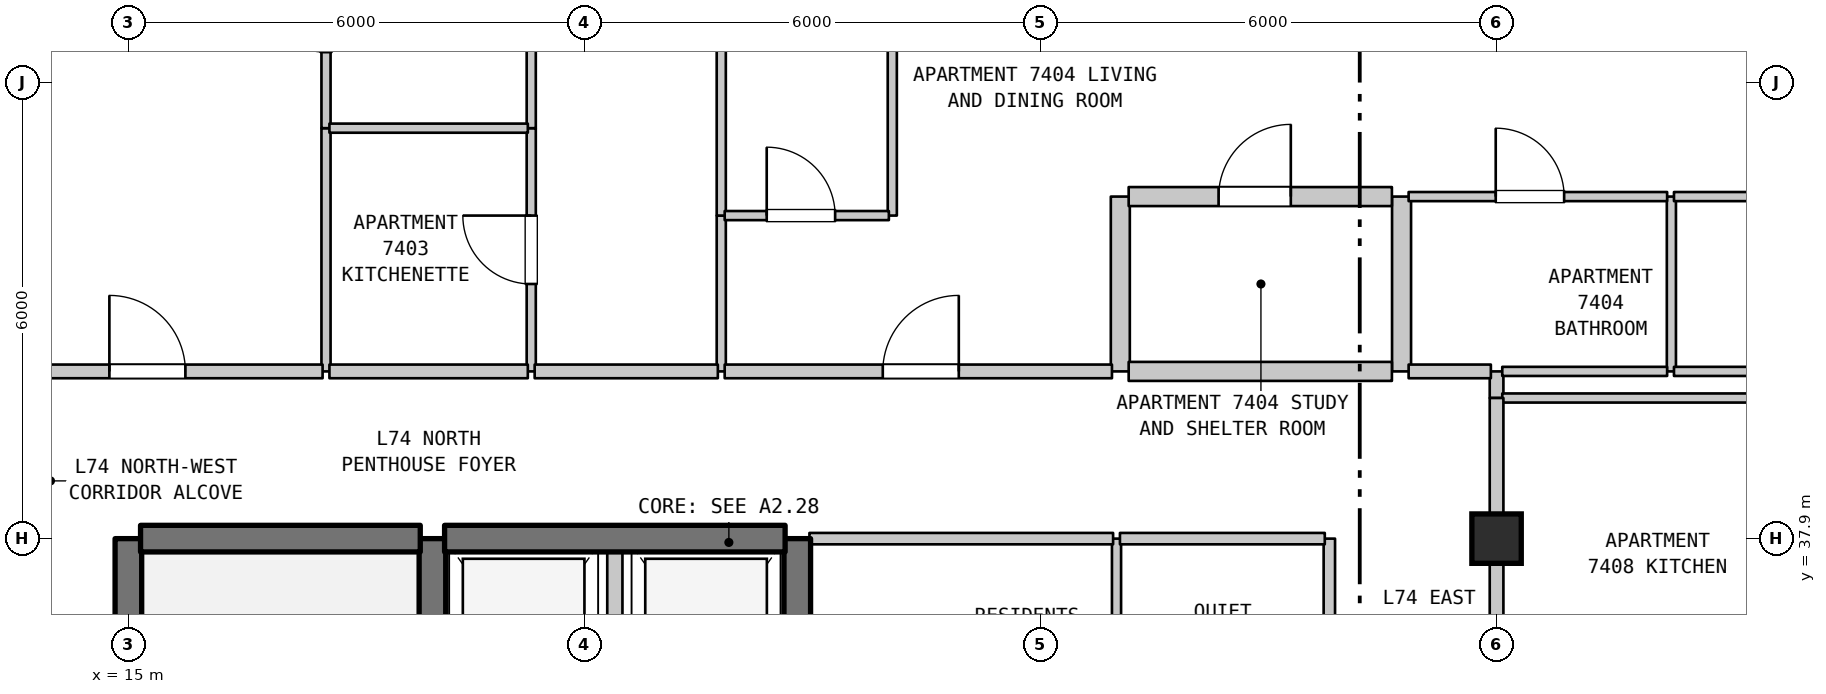
"""IFC4 building model, lengths in metres.
Left out: names, types, materials, properties, quantities, classifications, styles, units other than length and angle.
Written with IfcOpenShell. Run it as: python <this file> out.ifc"""

import sys

from ifc_helpers import new_model, si_unit, direction, frame, frame_2d, origin, origin_2d, place, context, subcontext, project, spatial, rectangle, extrude, element, fill, save


model = new_model("IFC4")
c1 = context("Model", 3, precision=1e-05, world=origin(), true_north=direction((0.0, 1.0)))
c2 = subcontext(c1, "Body", "Model", "MODEL_VIEW")
j1 = project(units=[si_unit("LENGTHUNIT", "METRE"), si_unit("PLANEANGLEUNIT", "RADIAN")], contexts=[c1])
p1 = place(None, origin())
s1 = spatial("IfcSite", under=j1, at=p1, CompositionType="ELEMENT")
p2 = place(p1, origin())
s2 = spatial("IfcBuilding", under=s1, at=p2, CompositionType="ELEMENT")
p3 = place(p2, frame((0.0, 0.0, 295.4)))
s3 = spatial("IfcBuildingStorey", under=s2, at=p3, CompositionType="ELEMENT", Elevation=295.4)
p4 = place(p3, frame((33.0, 37.9, 0.0), z_axis=(0.0, 0.0, 1.0), x_axis=(1.0, 0.0, 0.0)))
e1 = element("IfcColumn", 1, at=p4, inside=s3, PredefinedType="COLUMN", context=c2, shape_type="SweptSolid", body=[
    extrude(rectangle(XDim=0.65, YDim=0.65, at=origin_2d()), origin(), (0.0, 0.0, 1.0), 3.7),
])
p5 = place(p3, frame((15.0, 31.1, 0.0), z_axis=(0.0, 0.0, 1.0), x_axis=(0.0, 1.0, 0.0)))
e2 = element("IfcWall", 2, at=p5, inside=s3, PredefinedType="SHEAR", context=c2, shape_type="SweptSolid", body=[
    extrude(rectangle(XDim=6.8, YDim=0.35, at=frame_2d((3.4, 0.0))), origin(), (0.0, 0.0, 1.0), 3.38),
])
p6 = place(p3, frame((17.6, 40.1, 0.0), z_axis=(0.0, 0.0, 1.0), x_axis=(0.0, 1.0, 0.0)))
e3 = element("IfcWall", 3, at=p6, inside=s3, PredefinedType="PARTITIONING", context=c2, shape_type="SweptSolid", body=[
    extrude(rectangle(XDim=3.2, YDim=0.12, at=frame_2d((1.6, 0.0))), origin(), (0.0, 0.0, 1.0), 3.38),
])
p7 = place(p3, frame((17.6, 43.3, 0.0), z_axis=(0.0, 0.0, 1.0), x_axis=(0.0, 1.0, 0.0)))
e4 = element("IfcWall", 4, at=p7, inside=s3, PredefinedType="PARTITIONING", context=c2, shape_type="SweptSolid", body=[
    extrude(rectangle(XDim=2.9, YDim=0.12, at=frame_2d((1.45, 0.0))), origin(), (0.0, 0.0, 1.0), 3.38),
])
p8 = place(p7, frame((1.0, 0.0, 0.0)))
e5 = element("IfcOpeningElement", 5, at=p8, cuts=e4, PredefinedType="OPENING", context=c2, shape_type="SweptSolid", body=[
    extrude(rectangle(XDim=0.9, YDim=2.1, at=frame_2d((0.45, 1.05))), frame((0.0, 0.07, 0.0), z_axis=(0.0, -1.0, 0.0), x_axis=(1.0, 0.0, 0.0)), (0.0, 0.0, 1.0), 0.14),
])
p9 = place(p3, frame((19.0, 35.0, 0.0), z_axis=(0.0, 0.0, 1.0), x_axis=(0.0, 1.0, 0.0)))
e6 = element("IfcWall", 6, at=p9, inside=s3, PredefinedType="SHEAR", context=c2, shape_type="SweptSolid", body=[
    extrude(rectangle(XDim=2.9, YDim=0.35, at=frame_2d((1.45, 0.0))), origin(), (0.0, 0.0, 1.0), 3.38),
])
p10 = place(p3, frame((20.3, 40.1, 0.0), z_axis=(0.0, 0.0, 1.0), x_axis=(0.0, 1.0, 0.0)))
e7 = element("IfcWall", 7, at=p10, inside=s3, PredefinedType="PARTITIONING", context=c2, shape_type="SweptSolid", body=[
    extrude(rectangle(XDim=3.2, YDim=0.12, at=frame_2d((1.6, 0.0))), origin(), (0.0, 0.0, 1.0), 3.38),
])
p11 = place(p10, frame((1.15, 0.0, 0.0)))
e8 = element("IfcOpeningElement", 8, at=p11, cuts=e7, PredefinedType="OPENING", context=c2, shape_type="SweptSolid", body=[
    extrude(rectangle(XDim=0.9, YDim=2.15, at=frame_2d((0.45, 1.075))), frame((0.0, 0.07, 0.0), z_axis=(0.0, -1.0, 0.0), x_axis=(1.0, 0.0, 0.0)), (0.0, 0.0, 1.0), 0.14),
])
p12 = place(p3, frame((20.3, 43.3, 0.0), z_axis=(0.0, 0.0, 1.0), x_axis=(0.0, 1.0, 0.0)))
e9 = element("IfcWall", 9, at=p12, inside=s3, PredefinedType="PARTITIONING", context=c2, shape_type="SweptSolid", body=[
    extrude(rectangle(XDim=2.9, YDim=0.12, at=frame_2d((1.45, 0.0))), origin(), (0.0, 0.0, 1.0), 3.38),
])
p13 = place(p3, frame((21.4, 35.0, 0.0), z_axis=(0.0, 0.0, 1.0), x_axis=(0.0, 1.0, 0.0)))
e10 = element("IfcWall", 10, at=p13, inside=s3, PredefinedType="STANDARD", context=c2, shape_type="SweptSolid", body=[
    extrude(rectangle(XDim=2.9, YDim=0.2, at=frame_2d((1.45, 0.0))), origin(), (0.0, 0.0, 1.0), 3.38),
])
p14 = place(p3, frame((22.8, 40.1, 0.0), z_axis=(0.0, 0.0, 1.0), x_axis=(0.0, 1.0, 0.0)))
e11 = element("IfcWall", 11, at=p14, inside=s3, PredefinedType="PARTITIONING", context=c2, shape_type="SweptSolid", body=[
    extrude(rectangle(XDim=2.05, YDim=0.12, at=frame_2d((1.025, 0.0))), origin(), (0.0, 0.0, 1.0), 3.38),
])
p15 = place(p3, frame((22.8, 42.15, 0.0), z_axis=(0.0, 0.0, 1.0), x_axis=(0.0, 1.0, 0.0)))
e12 = element("IfcWall", 12, at=p15, inside=s3, PredefinedType="PARTITIONING", context=c2, shape_type="SweptSolid", body=[
    extrude(rectangle(XDim=11.74, YDim=0.12, at=frame_2d((5.87, 0.0))), origin(), (0.0, 0.0, 1.0), 3.38),
])
p16 = place(p3, frame((23.8, 35.0, 0.0), z_axis=(0.0, 0.0, 1.0), x_axis=(0.0, 1.0, 0.0)))
e13 = element("IfcWall", 13, at=p16, inside=s3, PredefinedType="SHEAR", context=c2, shape_type="SweptSolid", body=[
    extrude(rectangle(XDim=2.9, YDim=0.35, at=frame_2d((1.45, 0.0))), origin(), (0.0, 0.0, 1.0), 3.38),
])
p17 = place(p3, frame((25.05, 42.15, 0.0), z_axis=(0.0, 0.0, 1.0), x_axis=(0.0, 1.0, 0.0)))
e14 = element("IfcWall", 14, at=p17, inside=s3, PredefinedType="PARTITIONING", context=c2, shape_type="SweptSolid", body=[
    extrude(rectangle(XDim=11.74, YDim=0.12, at=frame_2d((5.87, 0.0))), origin(), (0.0, 0.0, 1.0), 3.38),
])
p18 = place(p3, frame((28.0, 35.0, 0.0), z_axis=(0.0, 0.0, 1.0), x_axis=(0.0, 1.0, 0.0)))
e15 = element("IfcWall", 15, at=p18, inside=s3, PredefinedType="PARTITIONING", context=c2, shape_type="SweptSolid", body=[
    extrude(rectangle(XDim=2.9, YDim=0.12, at=frame_2d((1.45, 0.0))), origin(), (0.0, 0.0, 1.0), 3.38),
])
p19 = place(p3, frame((28.05, 40.1, 0.0), z_axis=(0.0, 0.0, 1.0), x_axis=(0.0, 1.0, 0.0)))
e16 = element("IfcWall", 16, at=p19, inside=s3, PredefinedType="STANDARD", context=c2, shape_type="SweptSolid", body=[
    extrude(rectangle(XDim=2.3, YDim=0.25, at=frame_2d((1.15, 0.0))), origin(), (0.0, 0.0, 1.0), 3.38),
])
p20 = place(p3, frame((30.8, 35.0, 0.0), z_axis=(0.0, 0.0, 1.0), x_axis=(0.0, 1.0, 0.0)))
e17 = element("IfcWall", 17, at=p20, inside=s3, PredefinedType="STANDARD", context=c2, shape_type="SweptSolid", body=[
    extrude(rectangle(XDim=2.9, YDim=0.15, at=frame_2d((1.45, 0.0))), origin(), (0.0, 0.0, 1.0), 3.38),
])
p21 = place(p3, frame((31.75, 40.1, 0.0), z_axis=(0.0, 0.0, 1.0), x_axis=(0.0, 1.0, 0.0)))
e18 = element("IfcWall", 18, at=p21, inside=s3, PredefinedType="STANDARD", context=c2, shape_type="SweptSolid", body=[
    extrude(rectangle(XDim=2.3, YDim=0.25, at=frame_2d((1.15, 0.0))), origin(), (0.0, 0.0, 1.0), 3.38),
])
p22 = place(p3, frame((33.0, 35.755, 0.0), z_axis=(0.0, 0.0, 1.0), x_axis=(0.0, 1.0, 0.0)))
e19 = element("IfcWall", 19, at=p22, inside=s3, PredefinedType="STANDARD", context=c2, shape_type="SweptSolid", body=[
    extrude(rectangle(XDim=2.145, YDim=0.18, at=frame_2d((1.073, 0.0))), origin(), (0.0, 0.0, 1.0), 2.88),
])
p23 = place(p3, frame((33.0, 39.75, 0.0), z_axis=(0.0, 0.0, 1.0), x_axis=(0.0, 1.0, 0.0)))
e20 = element("IfcWall", 20, at=p23, inside=s3, PredefinedType="STANDARD", context=c2, shape_type="SweptSolid", body=[
    extrude(rectangle(XDim=0.35, YDim=0.18, at=frame_2d((0.175, 0.0))), origin(), (0.0, 0.0, 1.0), 3.38),
])
p24 = place(p3, frame((35.3, 40.1, 0.0), z_axis=(0.0, 0.0, 1.0), x_axis=(0.0, 1.0, 0.0)))
e21 = element("IfcWall", 21, at=p24, inside=s3, PredefinedType="PARTITIONING", context=c2, shape_type="SweptSolid", body=[
    extrude(rectangle(XDim=2.3, YDim=0.12, at=frame_2d((1.15, 0.0))), origin(), (0.0, 0.0, 1.0), 3.38),
])
p25 = place(p3, frame((15.16, 37.9, 0.0), z_axis=(0.0, 0.0, 1.0), x_axis=(1.0, 0.0, 0.0)))
e22 = element("IfcWall", 22, at=p25, inside=s3, PredefinedType="SHEAR", context=c2, shape_type="SweptSolid", body=[
    extrude(rectangle(XDim=3.68, YDim=0.35, at=frame_2d((1.84, 0.0))), origin(), (0.0, 0.0, 1.0), 3.38),
])
p26 = place(p3, frame((19.16, 37.9, 0.0), z_axis=(0.0, 0.0, 1.0), x_axis=(1.0, 0.0, 0.0)))
e23 = element("IfcWall", 23, at=p26, inside=s3, PredefinedType="SHEAR", context=c2, shape_type="SweptSolid", body=[
    extrude(rectangle(XDim=4.48, YDim=0.35, at=frame_2d((2.24, 0.0))), origin(), (0.0, 0.0, 1.0), 3.38),
])
p27 = place(p3, frame((23.96, 37.9, 0.0), z_axis=(0.0, 0.0, 1.0), x_axis=(1.0, 0.0, 0.0)))
e24 = element("IfcWall", 24, at=p27, inside=s3, PredefinedType="STANDARD", context=c2, shape_type="SweptSolid", body=[
    extrude(rectangle(XDim=3.995, YDim=0.15, at=frame_2d((1.998, 0.0))), origin(), (0.0, 0.0, 1.0), 2.88),
])
p28 = place(p3, frame((28.045, 37.9, 0.0), z_axis=(0.0, 0.0, 1.0), x_axis=(1.0, 0.0, 0.0)))
e25 = element("IfcWall", 25, at=p28, inside=s3, PredefinedType="STANDARD", context=c2, shape_type="SweptSolid", body=[
    extrude(rectangle(XDim=2.695, YDim=0.15, at=frame_2d((1.348, 0.0))), origin(), (0.0, 0.0, 1.0), 2.88),
])
p29 = place(p3, frame((33.075, 39.75, 0.0), z_axis=(0.0, 0.0, 1.0), x_axis=(1.0, 0.0, 0.0)))
e26 = element("IfcWall", 26, at=p29, inside=s3, PredefinedType="PARTITIONING", context=c2, shape_type="SweptSolid", body=[
    extrude(rectangle(XDim=4.46, YDim=0.12, at=frame_2d((2.23, 0.0))), origin(), (0.0, 0.0, 1.0), 3.38),
])
p30 = place(p3, frame((12.975, 40.1, 0.0), z_axis=(0.0, 0.0, 1.0), x_axis=(1.0, 0.0, 0.0)))
e27 = element("IfcWall", 27, at=p30, inside=s3, PredefinedType="STANDARD", context=c2, shape_type="SweptSolid", body=[
    extrude(rectangle(XDim=4.58, YDim=0.18, at=frame_2d((2.29, 0.0))), origin(), (0.0, 0.0, 1.0), 3.38),
])
p31 = place(p30, frame((1.775, 0.0, 0.0)))
e28 = element("IfcOpeningElement", 28, at=p31, cuts=e27, PredefinedType="OPENING", context=c2, shape_type="SweptSolid", body=[
    extrude(rectangle(XDim=1.0, YDim=2.15, at=frame_2d((0.5, 1.075))), frame((0.0, 0.1, 0.0), z_axis=(0.0, -1.0, 0.0), x_axis=(1.0, 0.0, 0.0)), (0.0, 0.0, 1.0), 0.2),
])
p32 = place(p3, frame((17.645, 40.1, 0.0), z_axis=(0.0, 0.0, 1.0), x_axis=(1.0, 0.0, 0.0)))
e29 = element("IfcWall", 29, at=p32, inside=s3, PredefinedType="STANDARD", context=c2, shape_type="SweptSolid", body=[
    extrude(rectangle(XDim=2.61, YDim=0.18, at=frame_2d((1.305, 0.0))), origin(), (0.0, 0.0, 1.0), 3.38),
])
p33 = place(p3, frame((20.345, 40.1, 0.0), z_axis=(0.0, 0.0, 1.0), x_axis=(1.0, 0.0, 0.0)))
e30 = element("IfcWall", 30, at=p33, inside=s3, PredefinedType="STANDARD", context=c2, shape_type="SweptSolid", body=[
    extrude(rectangle(XDim=2.41, YDim=0.18, at=frame_2d((1.205, 0.0))), origin(), (0.0, 0.0, 1.0), 3.38),
])
p34 = place(p3, frame((22.845, 40.1, 0.0), z_axis=(0.0, 0.0, 1.0), x_axis=(1.0, 0.0, 0.0)))
e31 = element("IfcWall", 31, at=p34, inside=s3, PredefinedType="STANDARD", context=c2, shape_type="SweptSolid", body=[
    extrude(rectangle(XDim=5.095, YDim=0.18, at=frame_2d((2.547, 0.0))), origin(), (0.0, 0.0, 1.0), 3.38),
])
p35 = place(p34, frame((2.08, 0.0, 0.0)))
e32 = element("IfcOpeningElement", 32, at=p35, cuts=e31, PredefinedType="OPENING", context=c2, shape_type="SweptSolid", body=[
    extrude(rectangle(XDim=1.0, YDim=2.15, at=frame_2d((0.5, 1.075))), frame((0.0, 0.1, 0.0), z_axis=(0.0, -1.0, 0.0), x_axis=(1.0, 0.0, 0.0)), (0.0, 0.0, 1.0), 0.2),
])
p36 = place(p3, frame((28.16, 40.1, 0.0), z_axis=(0.0, 0.0, 1.0), x_axis=(1.0, 0.0, 0.0)))
e33 = element("IfcWall", 33, at=p36, inside=s3, PredefinedType="STANDARD", context=c2, shape_type="SweptSolid", body=[
    extrude(rectangle(XDim=3.463, YDim=0.25, at=frame_2d((1.731, 0.0))), origin(), (0.0, 0.0, 1.0), 3.38),
])
p37 = place(p3, frame((31.843, 40.1, 0.0), z_axis=(0.0, 0.0, 1.0), x_axis=(1.0, 0.0, 0.0)))
e34 = element("IfcWall", 34, at=p37, inside=s3, PredefinedType="STANDARD", context=c2, shape_type="SweptSolid", body=[
    extrude(rectangle(XDim=1.082, YDim=0.18, at=frame_2d((0.541, 0.0))), origin(), (0.0, 0.0, 1.0), 3.38),
])
p38 = place(p3, frame((33.075, 40.1, 0.0), z_axis=(0.0, 0.0, 1.0), x_axis=(1.0, 0.0, 0.0)))
e35 = element("IfcWall", 35, at=p38, inside=s3, PredefinedType="PARTITIONING", context=c2, shape_type="SweptSolid", body=[
    extrude(rectangle(XDim=2.169, YDim=0.12, at=frame_2d((1.084, 0.0))), origin(), (0.0, 0.0, 1.0), 3.38),
])
p39 = place(p3, frame((35.334, 40.1, 0.0), z_axis=(0.0, 0.0, 1.0), x_axis=(1.0, 0.0, 0.0)))
e36 = element("IfcWall", 36, at=p39, inside=s3, PredefinedType="PARTITIONING", context=c2, shape_type="SweptSolid", body=[
    extrude(rectangle(XDim=5.041, YDim=0.12, at=frame_2d((2.521, 0.0))), origin(), (0.0, 0.0, 1.0), 3.38),
])
p40 = place(p3, frame((22.845, 42.15, 0.0), z_axis=(0.0, 0.0, 1.0), x_axis=(1.0, 0.0, 0.0)))
e37 = element("IfcWall", 37, at=p40, inside=s3, PredefinedType="PARTITIONING", context=c2, shape_type="SweptSolid", body=[
    extrude(rectangle(XDim=2.16, YDim=0.12, at=frame_2d((1.08, 0.0))), origin(), (0.0, 0.0, 1.0), 3.38),
])
p41 = place(p40, frame((0.553, 0.0, 0.0)))
e38 = element("IfcOpeningElement", 38, at=p41, cuts=e37, PredefinedType="OPENING", context=c2, shape_type="SweptSolid", body=[
    extrude(rectangle(XDim=0.9, YDim=2.15, at=frame_2d((0.45, 1.075))), frame((0.0, 0.07, 0.0), z_axis=(0.0, -1.0, 0.0), x_axis=(1.0, 0.0, 0.0)), (0.0, 0.0, 1.0), 0.14),
])
p42 = place(p3, frame((28.16, 42.4, 0.0), z_axis=(0.0, 0.0, 1.0), x_axis=(1.0, 0.0, 0.0)))
e39 = element("IfcWall", 39, at=p42, inside=s3, PredefinedType="STANDARD", context=c2, shape_type="SweptSolid", body=[
    extrude(rectangle(XDim=3.463, YDim=0.25, at=frame_2d((1.731, 0.0))), origin(), (0.0, 0.0, 1.0), 3.38),
])
p43 = place(p42, frame((1.183, 0.0, 0.0)))
e40 = element("IfcOpeningElement", 40, at=p43, cuts=e39, PredefinedType="OPENING", context=c2, shape_type="SweptSolid", body=[
    extrude(rectangle(XDim=0.95, YDim=2.15, at=frame_2d((0.475, 1.075))), frame((0.0, 0.135, 0.0), z_axis=(0.0, -1.0, 0.0), x_axis=(1.0, 0.0, 0.0)), (0.0, 0.0, 1.0), 0.27),
])
p44 = place(p3, frame((31.843, 42.4, 0.0), z_axis=(0.0, 0.0, 1.0), x_axis=(1.0, 0.0, 0.0)))
e41 = element("IfcWall", 41, at=p44, inside=s3, PredefinedType="PARTITIONING", context=c2, shape_type="SweptSolid", body=[
    extrude(rectangle(XDim=3.401, YDim=0.12, at=frame_2d((1.7, 0.0))), origin(), (0.0, 0.0, 1.0), 3.38),
])
p45 = place(p44, frame((1.146, 0.0, 0.0)))
e42 = element("IfcOpeningElement", 42, at=p45, cuts=e41, PredefinedType="OPENING", context=c2, shape_type="SweptSolid", body=[
    extrude(rectangle(XDim=0.9, YDim=2.1, at=frame_2d((0.45, 1.05))), frame((0.0, 0.07, 0.0), z_axis=(0.0, -1.0, 0.0), x_axis=(1.0, 0.0, 0.0)), (0.0, 0.0, 1.0), 0.14),
])
p46 = place(p3, frame((35.334, 42.4, 0.0), z_axis=(0.0, 0.0, 1.0), x_axis=(1.0, 0.0, 0.0)))
e43 = element("IfcWall", 43, at=p46, inside=s3, PredefinedType="PARTITIONING", context=c2, shape_type="SweptSolid", body=[
    extrude(rectangle(XDim=5.372, YDim=0.12, at=frame_2d((2.686, 0.0))), origin(), (0.0, 0.0, 1.0), 3.38),
])
p47 = place(p46, frame((2.166, 0.0, 0.0)))
e44 = element("IfcOpeningElement", 44, at=p47, cuts=e43, PredefinedType="OPENING", context=c2, shape_type="SweptSolid", body=[
    extrude(rectangle(XDim=0.9, YDim=2.15, at=frame_2d((0.45, 1.075))), frame((0.0, 0.07, 0.0), z_axis=(0.0, -1.0, 0.0), x_axis=(1.0, 0.0, 0.0)), (0.0, 0.0, 1.0), 0.14),
])
p48 = place(p3, frame((17.645, 43.3, 0.0), z_axis=(0.0, 0.0, 1.0), x_axis=(1.0, 0.0, 0.0)))
e45 = element("IfcWall", 45, at=p48, inside=s3, PredefinedType="PARTITIONING", context=c2, shape_type="SweptSolid", body=[
    extrude(rectangle(XDim=2.61, YDim=0.12, at=frame_2d((1.305, 0.0))), origin(), (0.0, 0.0, 1.0), 3.38),
])
p49 = place(p3, frame((33.0, 37.9, 0.0), z_axis=(0.0, 0.0, 1.0), x_axis=(0.0, 1.0, 0.0)))
e46 = element("IfcWall", 46, at=p49, inside=s3, PredefinedType="STANDARD", context=c2, shape_type="SweptSolid", body=[
    extrude(rectangle(XDim=1.85, YDim=0.18, at=frame_2d((0.925, 0.0))), origin(), (0.0, 0.0, 1.0), 2.78),
])
p50 = place(p11, origin())
e47 = element("IfcDoor", 47, at=p50, inside=s3, OperationType="SINGLE_SWING_RIGHT", PredefinedType="DOOR", context=c2, shape_type="SweptSolid", body=[
    extrude(rectangle(XDim=0.9, YDim=2.15, at=frame_2d((0.45, 1.075))), frame((0.0, 0.025, 0.0), z_axis=(0.0, -1.0, 0.0), x_axis=(1.0, 0.0, 0.0)), (0.0, 0.0, 1.0), 0.05),
])
fill(e8, e47)
p51 = place(p31, origin())
e48 = element("IfcDoor", 48, at=p51, inside=s3, OperationType="SINGLE_SWING_LEFT", PredefinedType="DOOR", context=c2, shape_type="SweptSolid", body=[
    extrude(rectangle(XDim=1.0, YDim=2.15, at=frame_2d((0.5, 1.075))), frame((0.0, 0.025, 0.0), z_axis=(0.0, -1.0, 0.0), x_axis=(1.0, 0.0, 0.0)), (0.0, 0.0, 1.0), 0.05),
])
fill(e28, e48)
p52 = place(p35, origin())
e49 = element("IfcDoor", 49, at=p52, inside=s3, OperationType="SINGLE_SWING_RIGHT", PredefinedType="DOOR", context=c2, shape_type="SweptSolid", body=[
    extrude(rectangle(XDim=1.0, YDim=2.15, at=frame_2d((0.5, 1.075))), frame((0.0, 0.025, 0.0), z_axis=(0.0, -1.0, 0.0), x_axis=(1.0, 0.0, 0.0)), (0.0, 0.0, 1.0), 0.05),
])
fill(e32, e49)
p53 = place(p41, origin())
e50 = element("IfcDoor", 50, at=p53, inside=s3, OperationType="SINGLE_SWING_LEFT", PredefinedType="DOOR", context=c2, shape_type="SweptSolid", body=[
    extrude(rectangle(XDim=0.9, YDim=2.15, at=frame_2d((0.45, 1.075))), frame((0.0, 0.025, 0.0), z_axis=(0.0, -1.0, 0.0), x_axis=(1.0, 0.0, 0.0)), (0.0, 0.0, 1.0), 0.05),
])
fill(e38, e50)
p54 = place(p43, origin())
e51 = element("IfcDoor", 51, at=p54, inside=s3, OperationType="SINGLE_SWING_RIGHT", PredefinedType="DOOR", context=c2, shape_type="SweptSolid", body=[
    extrude(rectangle(XDim=0.95, YDim=2.15, at=frame_2d((0.475, 1.075))), frame((0.0, 0.025, 0.0), z_axis=(0.0, -1.0, 0.0), x_axis=(1.0, 0.0, 0.0)), (0.0, 0.0, 1.0), 0.05),
])
fill(e40, e51)
p55 = place(p45, origin())
e52 = element("IfcDoor", 52, at=p55, inside=s3, OperationType="SINGLE_SWING_LEFT", PredefinedType="DOOR", context=c2, shape_type="SweptSolid", body=[
    extrude(rectangle(XDim=0.9, YDim=2.1, at=frame_2d((0.45, 1.05))), frame((0.0, 0.025, 0.0), z_axis=(0.0, -1.0, 0.0), x_axis=(1.0, 0.0, 0.0)), (0.0, 0.0, 1.0), 0.05),
])
fill(e42, e52)
save(model, sys.argv[1])
